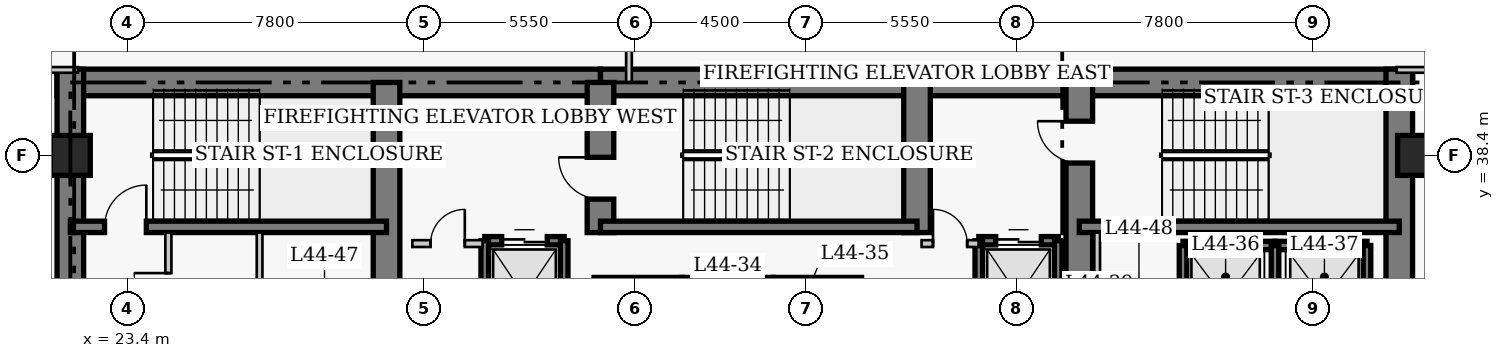
"""IFC4 building model, lengths in metres.
Left out: names, types, materials, properties, quantities, classifications, styles, units other than length and angle.
Written with IfcOpenShell. Run it as: python <this file> out.ifc"""

import sys

from ifc_helpers import new_model, si_unit, direction, frame, frame_2d, origin, origin_2d, place, context, subcontext, project, spatial, rectangle, extrude, element, fill, save


model = new_model("IFC4")
c1 = context("Model", 3, precision=1e-05, world=origin(), true_north=direction((0.0, 1.0)))
c2 = subcontext(c1, "Body", "Model", "MODEL_VIEW")
j1 = project(units=[si_unit("LENGTHUNIT", "METRE"), si_unit("PLANEANGLEUNIT", "RADIAN")], contexts=[c1])
p1 = place(None, origin())
s1 = spatial("IfcSite", under=j1, at=p1, CompositionType="ELEMENT")
p2 = place(p1, origin())
s2 = spatial("IfcBuilding", under=s1, at=p2, CompositionType="ELEMENT")
p3 = place(p2, frame((0.0, 0.0, 176.4)))
s3 = spatial("IfcBuildingStorey", under=s2, at=p3, CompositionType="ELEMENT", Elevation=176.4)
p4 = place(p3, frame((21.55, 40.32, 0.0), z_axis=(0.0, 0.0, 1.0), x_axis=(1.0, 0.0, 0.0)))
e1 = element("IfcWall", 1, at=p4, inside=s3, PredefinedType="SHEAR", context=c2, shape_type="SweptSolid", body=[
    extrude(rectangle(XDim=14.3, YDim=0.7, at=frame_2d((7.15, 0.0))), origin(), (0.0, 0.0, 1.0), 3.8),
])
p5 = place(p3, frame((35.85, 40.32, 0.0), z_axis=(0.0, 0.0, 1.0), x_axis=(1.0, 0.0, 0.0)))
e2 = element("IfcWall", 2, at=p5, inside=s3, PredefinedType="SHEAR", context=c2, shape_type="SweptSolid", body=[
    extrude(rectangle(XDim=12.6, YDim=0.7, at=frame_2d((6.3, 0.0))), origin(), (0.0, 0.0, 1.0), 3.8),
])
p6 = place(p3, frame((48.45, 40.32, 0.0), z_axis=(0.0, 0.0, 1.0), x_axis=(1.0, 0.0, 0.0)))
e3 = element("IfcWall", 3, at=p6, inside=s3, PredefinedType="SHEAR", context=c2, shape_type="SweptSolid", body=[
    extrude(rectangle(XDim=8.77, YDim=0.7, at=frame_2d((4.385, 0.0))), origin(), (0.0, 0.0, 1.0), 3.8),
])
for number, where, z_axis, x_axis in (
    (4, (21.9, 27.05, 0.0), (0.0, 0.0, 1.0), (0.0, 1.0, 0.0)),
    (5, (56.87, 27.05, 0.0), (0.0, 0.0, 1.0), (0.0, 1.0, 0.0)),
):
    element("IfcWall", number, at=place(p3, frame(where, z_axis=z_axis, x_axis=x_axis)), inside=s3, PredefinedType="SHEAR", context=c2, shape_type="SweptSolid", body=[
        extrude(rectangle(XDim=13.62, YDim=0.7, at=frame_2d((6.81, 0.0))), origin(), (0.0, 0.0, 1.0), 3.8),
    ])
p7 = place(p3, frame((30.22, 33.1, 0.0), z_axis=(0.0, 0.0, 1.0), x_axis=(0.0, 1.0, 0.0)))
e6 = element("IfcWall", 6, at=p7, inside=s3, PredefinedType="SHEAR", context=c2, shape_type="SweptSolid", body=[
    extrude(rectangle(XDim=7.22, YDim=0.7, at=frame_2d((3.61, 0.0))), origin(), (0.0, 0.0, 1.0), 3.8),
])
p8 = place(p3, frame((35.85, 36.37, 0.0), z_axis=(0.0, 0.0, 1.0), x_axis=(0.0, 1.0, 0.0)))
e7 = element("IfcWall", 7, at=p8, inside=s3, PredefinedType="SHEAR", context=c2, shape_type="SweptSolid", body=[
    extrude(rectangle(XDim=3.95, YDim=0.7, at=frame_2d((1.975, 0.0))), origin(), (0.0, 0.0, 1.0), 3.8),
])
p9 = place(p8, frame((0.88, 0.0, 0.0)))
e8 = element("IfcOpeningElement", 8, at=p9, cuts=e7, PredefinedType="OPENING", context=c2, shape_type="SweptSolid", body=[
    extrude(rectangle(XDim=1.1, YDim=2.15, at=frame_2d((0.55, 1.075))), frame((0.0, 0.36, 0.0), z_axis=(0.0, -1.0, 0.0), x_axis=(1.0, 0.0, 0.0)), (0.0, 0.0, 1.0), 0.72),
])
p10 = place(p3, frame((44.18, 36.37, 0.0), z_axis=(0.0, 0.0, 1.0), x_axis=(0.0, 1.0, 0.0)))
e9 = element("IfcWall", 9, at=p10, inside=s3, PredefinedType="SHEAR", context=c2, shape_type="SweptSolid", body=[
    extrude(rectangle(XDim=3.95, YDim=0.7, at=frame_2d((1.975, 0.0))), origin(), (0.0, 0.0, 1.0), 3.8),
])
p11 = place(p3, frame((48.45, 32.4, 0.0), z_axis=(0.0, 0.0, 1.0), x_axis=(0.0, 1.0, 0.0)))
e10 = element("IfcWall", 10, at=p11, inside=s3, PredefinedType="SHEAR", context=c2, shape_type="SweptSolid", body=[
    extrude(rectangle(XDim=7.92, YDim=0.7, at=frame_2d((3.96, 0.0))), origin(), (0.0, 0.0, 1.0), 3.8),
])
p12 = place(p11, frame((5.8, 0.0, 0.0)))
e11 = element("IfcOpeningElement", 11, at=p12, cuts=e10, PredefinedType="OPENING", context=c2, shape_type="SweptSolid", body=[
    extrude(rectangle(XDim=1.1, YDim=2.15, at=frame_2d((0.55, 1.075))), frame((0.0, 0.36, 0.0), z_axis=(0.0, -1.0, 0.0), x_axis=(1.0, 0.0, 0.0)), (0.0, 0.0, 1.0), 0.72),
])
p13 = place(p3, frame((21.9, 36.52, 0.0), z_axis=(0.0, 0.0, 1.0), x_axis=(1.0, 0.0, 0.0)))
e12 = element("IfcWall", 12, at=p13, inside=s3, PredefinedType="SHEAR", context=c2, shape_type="SweptSolid", body=[
    extrude(rectangle(XDim=8.32, YDim=0.3, at=frame_2d((4.16, 0.0))), origin(), (0.0, 0.0, 1.0), 3.8),
])
p14 = place(p13, frame((0.9, 0.0, 0.0)))
e13 = element("IfcOpeningElement", 13, at=p14, cuts=e12, PredefinedType="OPENING", context=c2, shape_type="SweptSolid", body=[
    extrude(rectangle(XDim=1.1, YDim=2.15, at=frame_2d((0.55, 1.075))), frame((0.0, 0.16, 0.0), z_axis=(0.0, -1.0, 0.0), x_axis=(1.0, 0.0, 0.0)), (0.0, 0.0, 1.0), 0.32),
])
p15 = place(p3, frame((35.85, 36.52, 0.0), z_axis=(0.0, 0.0, 1.0), x_axis=(1.0, 0.0, 0.0)))
e14 = element("IfcWall", 14, at=p15, inside=s3, PredefinedType="SHEAR", context=c2, shape_type="SweptSolid", body=[
    extrude(rectangle(XDim=8.33, YDim=0.3, at=frame_2d((4.165, 0.0))), origin(), (0.0, 0.0, 1.0), 3.8),
])
p16 = place(p3, frame((48.45, 36.52, 0.0), z_axis=(0.0, 0.0, 1.0), x_axis=(1.0, 0.0, 0.0)))
e15 = element("IfcWall", 15, at=p16, inside=s3, PredefinedType="SHEAR", context=c2, shape_type="SweptSolid", body=[
    extrude(rectangle(XDim=8.42, YDim=0.3, at=frame_2d((4.21, 0.0))), origin(), (0.0, 0.0, 1.0), 3.8),
])
for number, where, z_axis, x_axis in (
    (16, (21.9, 38.4, 0.0), (0.0, 0.0, 1.0), (1.0, 0.0, 0.0)),
    (17, (57.35, 38.4, 0.0), (0.0, 0.0, 1.0), (1.0, 0.0, 0.0)),
):
    element("IfcColumn", number, at=place(p3, frame(where, z_axis=z_axis, x_axis=x_axis)), inside=s3, PredefinedType="COLUMN", context=c2, shape_type="SweptSolid", body=[
        extrude(rectangle(XDim=1.05, YDim=1.05, at=origin_2d()), origin(), (0.0, 0.0, 1.0), 3.8),
    ])
p17 = place(p3, frame((35.68, 35.08, 0.0), z_axis=(0.0, 0.0, 1.0), x_axis=(1.0, 0.0, 0.0)))
e18 = element("IfcWall", 18, at=p17, inside=s3, PredefinedType="SHEAR", context=c2, shape_type="SweptSolid", body=[
    extrude(rectangle(XDim=2.32, YDim=0.22, at=frame_2d((1.16, 0.0))), origin(), (0.0, 0.0, 1.0), 3.8),
])
p18 = place(p3, frame((38.0, 35.08, 0.0), z_axis=(0.0, 0.0, 1.0), x_axis=(1.0, 0.0, 0.0)))
e19 = element("IfcWall", 19, at=p18, inside=s3, PredefinedType="SHEAR", context=c2, shape_type="SweptSolid", body=[
    extrude(rectangle(XDim=2.4, YDim=0.22, at=frame_2d((1.2, 0.0))), origin(), (0.0, 0.0, 1.0), 3.8),
])
p19 = place(p3, frame((40.4, 35.08, 0.0), z_axis=(0.0, 0.0, 1.0), x_axis=(1.0, 0.0, 0.0)))
e20 = element("IfcWall", 20, at=p19, inside=s3, PredefinedType="SHEAR", context=c2, shape_type="SweptSolid", body=[
    extrude(rectangle(XDim=2.32, YDim=0.22, at=frame_2d((1.16, 0.0))), origin(), (0.0, 0.0, 1.0), 3.8),
])
p20 = place(p3, frame((51.18, 36.03, 0.0), z_axis=(0.0, 0.0, 1.0), x_axis=(1.0, 0.0, 0.0)))
e21 = element("IfcWall", 21, at=p20, inside=s3, PredefinedType="SHEAR", context=c2, shape_type="SweptSolid", body=[
    extrude(rectangle(XDim=2.42, YDim=0.22, at=frame_2d((1.21, 0.0))), origin(), (0.0, 0.0, 1.0), 3.8),
])
p21 = place(p3, frame((51.18, 33.17, 0.0), z_axis=(0.0, 0.0, 1.0), x_axis=(0.0, 1.0, 0.0)))
e22 = element("IfcWall", 22, at=p21, inside=s3, PredefinedType="SHEAR", context=c2, shape_type="SweptSolid", body=[
    extrude(rectangle(XDim=2.86, YDim=0.2, at=frame_2d((1.43, 0.0))), origin(), (0.0, 0.0, 1.0), 3.8),
])
p22 = place(p3, frame((53.6, 36.03, 0.0), z_axis=(0.0, 0.0, 1.0), x_axis=(1.0, 0.0, 0.0)))
e23 = element("IfcWall", 23, at=p22, inside=s3, PredefinedType="SHEAR", context=c2, shape_type="SweptSolid", body=[
    extrude(rectangle(XDim=2.42, YDim=0.22, at=frame_2d((1.21, 0.0))), origin(), (0.0, 0.0, 1.0), 3.8),
])
for number, where, z_axis, x_axis in (
    (24, (53.6, 33.17, 0.0), (0.0, 0.0, 1.0), (0.0, 1.0, 0.0)),
    (25, (56.02, 33.17, 0.0), (0.0, 0.0, 1.0), (0.0, 1.0, 0.0)),
):
    element("IfcWall", number, at=place(p3, frame(where, z_axis=z_axis, x_axis=x_axis)), inside=s3, PredefinedType="SHEAR", context=c2, shape_type="SweptSolid", body=[
        extrude(rectangle(XDim=2.86, YDim=0.2, at=frame_2d((1.43, 0.0))), origin(), (0.0, 0.0, 1.0), 3.8),
    ])
p23 = place(p3, frame((32.805, 36.155, 0.0), z_axis=(0.0, 0.0, 1.0), x_axis=(1.0, 0.0, 0.0)))
e26 = element("IfcWall", 26, at=p23, inside=s3, PredefinedType="SHEAR", context=c2, shape_type="SweptSolid", body=[
    extrude(rectangle(XDim=2.09, YDim=0.22, at=frame_2d((1.045, 0.0))), origin(), (0.0, 0.0, 1.0), 3.8),
])
p24 = place(p23, frame((0.445, 0.0, 0.0)))
e27 = element("IfcOpeningElement", 27, at=p24, cuts=e26, PredefinedType="OPENING", context=c2, shape_type="SweptSolid", body=[
    extrude(rectangle(XDim=1.2, YDim=2.15, at=frame_2d((0.6, 1.075))), frame((0.0, 0.12, 0.0), z_axis=(0.0, -1.0, 0.0), x_axis=(1.0, 0.0, 0.0)), (0.0, 0.0, 1.0), 0.24),
])
for number, where, z_axis, x_axis in (
    (28, (32.805, 33.245, 0.0), (0.0, 0.0, 1.0), (0.0, 1.0, 0.0)),
    (29, (34.895, 33.245, 0.0), (0.0, 0.0, 1.0), (0.0, 1.0, 0.0)),
):
    element("IfcWall", number, at=place(p3, frame(where, z_axis=z_axis, x_axis=x_axis)), inside=s3, PredefinedType="SHEAR", context=c2, shape_type="SweptSolid", body=[
        extrude(rectangle(XDim=2.91, YDim=0.2, at=frame_2d((1.455, 0.0))), origin(), (0.0, 0.0, 1.0), 3.8),
    ])
p25 = place(p3, frame((45.805, 36.155, 0.0), z_axis=(0.0, 0.0, 1.0), x_axis=(1.0, 0.0, 0.0)))
e30 = element("IfcWall", 30, at=p25, inside=s3, PredefinedType="SHEAR", context=c2, shape_type="SweptSolid", body=[
    extrude(rectangle(XDim=2.09, YDim=0.22, at=frame_2d((1.045, 0.0))), origin(), (0.0, 0.0, 1.0), 3.8),
])
p26 = place(p25, frame((0.445, 0.0, 0.0)))
e31 = element("IfcOpeningElement", 31, at=p26, cuts=e30, PredefinedType="OPENING", context=c2, shape_type="SweptSolid", body=[
    extrude(rectangle(XDim=1.2, YDim=2.15, at=frame_2d((0.6, 1.075))), frame((0.0, 0.12, 0.0), z_axis=(0.0, -1.0, 0.0), x_axis=(1.0, 0.0, 0.0)), (0.0, 0.0, 1.0), 0.24),
])
p27 = place(p3, frame((45.805, 32.65, 0.0), z_axis=(0.0, 0.0, 1.0), x_axis=(0.0, 1.0, 0.0)))
e32 = element("IfcWall", 32, at=p27, inside=s3, PredefinedType="SHEAR", context=c2, shape_type="SweptSolid", body=[
    extrude(rectangle(XDim=3.505, YDim=0.2, at=frame_2d((1.752, 0.0))), origin(), (0.0, 0.0, 1.0), 3.8),
])
p28 = place(p3, frame((47.895, 33.245, 0.0), z_axis=(0.0, 0.0, 1.0), x_axis=(0.0, 1.0, 0.0)))
e33 = element("IfcWall", 33, at=p28, inside=s3, PredefinedType="SHEAR", context=c2, shape_type="SweptSolid", body=[
    extrude(rectangle(XDim=2.91, YDim=0.2, at=frame_2d((1.455, 0.0))), origin(), (0.0, 0.0, 1.0), 3.8),
])
p29 = place(p3, frame((30.9, 36.08, 0.0), z_axis=(0.0, 0.0, 1.0), x_axis=(1.0, 0.0, 0.0)))
e34 = element("IfcWall", 34, at=p29, inside=s3, PredefinedType="PARTITIONING", context=c2, shape_type="SweptSolid", body=[
    extrude(rectangle(XDim=1.85, YDim=0.18, at=frame_2d((0.925, 0.0))), origin(), (0.0, 0.0, 1.0), 3.55),
])
p30 = place(p29, frame((0.48, 0.0, 0.0)))
e35 = element("IfcOpeningElement", 35, at=p30, cuts=e34, PredefinedType="OPENING", context=c2, shape_type="SweptSolid", body=[
    extrude(rectangle(XDim=0.9, YDim=2.15, at=frame_2d((0.45, 1.075))), frame((0.0, 0.1, 0.0), z_axis=(0.0, -1.0, 0.0), x_axis=(1.0, 0.0, 0.0)), (0.0, 0.0, 1.0), 0.2),
])
p31 = place(p3, frame((44.3, 36.08, 0.0), z_axis=(0.0, 0.0, 1.0), x_axis=(1.0, 0.0, 0.0)))
e36 = element("IfcWall", 36, at=p31, inside=s3, PredefinedType="PARTITIONING", context=c2, shape_type="SweptSolid", body=[
    extrude(rectangle(XDim=1.5, YDim=0.18, at=frame_2d((0.75, 0.0))), origin(), (0.0, 0.0, 1.0), 3.55),
])
p32 = place(p31, frame((0.3, 0.0, 0.0)))
e37 = element("IfcOpeningElement", 37, at=p32, cuts=e36, PredefinedType="OPENING", context=c2, shape_type="SweptSolid", body=[
    extrude(rectangle(XDim=0.9, YDim=2.15, at=frame_2d((0.45, 1.075))), frame((0.0, 0.1, 0.0), z_axis=(0.0, -1.0, 0.0), x_axis=(1.0, 0.0, 0.0)), (0.0, 0.0, 1.0), 0.2),
])
p33 = place(p3, frame((24.48, 32.8, 0.0), z_axis=(0.0, 0.0, 1.0), x_axis=(0.0, 1.0, 0.0)))
e38 = element("IfcWall", 38, at=p33, inside=s3, PredefinedType="PARTITIONING", context=c2, shape_type="SweptSolid", body=[
    extrude(rectangle(XDim=3.57, YDim=0.16, at=frame_2d((1.785, 0.0))), origin(), (0.0, 0.0, 1.0), 3.55),
])
p34 = place(p33, frame((1.604, 0.0, 0.0)))
e39 = element("IfcOpeningElement", 39, at=p34, cuts=e38, PredefinedType="OPENING", context=c2, shape_type="SweptSolid", body=[
    extrude(rectangle(XDim=0.9, YDim=2.1, at=frame_2d((0.45, 1.05))), frame((0.0, 0.09, 0.0), z_axis=(0.0, -1.0, 0.0), x_axis=(1.0, 0.0, 0.0)), (0.0, 0.0, 1.0), 0.18),
])
for number, where, z_axis, x_axis in (
    (40, (48.92, 32.75, 0.0), (0.0, 0.0, 1.0), (0.0, 1.0, 0.0)),
    (41, (26.88, 32.75, 0.0), (0.0, 0.0, 1.0), (0.0, 1.0, 0.0)),
):
    element("IfcWall", number, at=place(p3, frame(where, z_axis=z_axis, x_axis=x_axis)), inside=s3, PredefinedType="PARTITIONING", context=c2, shape_type="SweptSolid", body=[
        extrude(rectangle(XDim=3.62, YDim=0.15, at=frame_2d((1.81, 0.0))), origin(), (0.0, 0.0, 1.0), 3.55),
    ])
p35 = place(p3, frame((18.24, 40.65, 0.0), z_axis=(0.0, 0.0, 1.0), x_axis=(1.0, 0.0, 0.0)))
e42 = element("IfcWall", 42, at=p35, inside=s3, PredefinedType="PARTITIONING", context=c2, shape_type="SweptSolid", body=[
    extrude(rectangle(XDim=3.86, YDim=0.15, at=frame_2d((1.93, 0.0))), origin(), (0.0, 0.0, 1.0), 3.55),
])
p36 = place(p35, frame((0.55, 0.0, 0.0)))
e43 = element("IfcOpeningElement", 43, at=p36, cuts=e42, PredefinedType="OPENING", context=c2, shape_type="SweptSolid", body=[
    extrude(rectangle(XDim=1.0, YDim=2.15, at=frame_2d((0.5, 1.075))), frame((0.0, 0.085, 0.0), z_axis=(0.0, -1.0, 0.0), x_axis=(1.0, 0.0, 0.0)), (0.0, 0.0, 1.0), 0.17),
])
p37 = place(p3, frame((56.8, 40.65, 0.0), z_axis=(0.0, 0.0, 1.0), x_axis=(1.0, 0.0, 0.0)))
e44 = element("IfcWall", 44, at=p37, inside=s3, PredefinedType="PARTITIONING", context=c2, shape_type="SweptSolid", body=[
    extrude(rectangle(XDim=4.56, YDim=0.15, at=frame_2d((2.28, 0.0))), origin(), (0.0, 0.0, 1.0), 3.55),
])
p38 = place(p37, frame((2.95, 0.0, 0.0)))
e45 = element("IfcOpeningElement", 45, at=p38, cuts=e44, PredefinedType="OPENING", context=c2, shape_type="SweptSolid", body=[
    extrude(rectangle(XDim=1.0, YDim=2.15, at=frame_2d((0.5, 1.075))), frame((0.0, 0.085, 0.0), z_axis=(0.0, -1.0, 0.0), x_axis=(1.0, 0.0, 0.0)), (0.0, 0.0, 1.0), 0.17),
])
p39 = place(p3, frame((36.6, 40.32, 0.0), z_axis=(0.0, 0.0, 1.0), x_axis=(0.0, 1.0, 0.0)))
e46 = element("IfcWall", 46, at=p39, inside=s3, PredefinedType="PARTITIONING", context=c2, shape_type="SweptSolid", body=[
    extrude(rectangle(XDim=1.845, YDim=0.15, at=frame_2d((0.922, 0.0))), origin(), (0.0, 0.0, 1.0), 3.55),
])
p40 = place(p24, origin())
e47 = element("IfcDoor", 47, at=p40, inside=s3, OperationType="DOUBLE_DOOR_SLIDING", PredefinedType="DOOR", context=c2, shape_type="SweptSolid", body=[
    extrude(rectangle(XDim=1.2, YDim=2.15, at=frame_2d((0.6, 1.075))), frame((0.0, 0.025, 0.0), z_axis=(0.0, -1.0, 0.0), x_axis=(1.0, 0.0, 0.0)), (0.0, 0.0, 1.0), 0.05),
])
fill(e27, e47)
p41 = place(p26, origin())
e48 = element("IfcDoor", 48, at=p41, inside=s3, OperationType="DOUBLE_DOOR_SLIDING", PredefinedType="DOOR", context=c2, shape_type="SweptSolid", body=[
    extrude(rectangle(XDim=1.2, YDim=2.15, at=frame_2d((0.6, 1.075))), frame((0.0, 0.025, 0.0), z_axis=(0.0, -1.0, 0.0), x_axis=(1.0, 0.0, 0.0)), (0.0, 0.0, 1.0), 0.05),
])
fill(e31, e48)
p42 = place(p30, origin())
e49 = element("IfcDoor", 49, at=p42, inside=s3, OperationType="SINGLE_SWING_RIGHT", PredefinedType="DOOR", context=c2, shape_type="SweptSolid", body=[
    extrude(rectangle(XDim=0.9, YDim=2.15, at=frame_2d((0.45, 1.075))), frame((0.0, 0.025, 0.0), z_axis=(0.0, -1.0, 0.0), x_axis=(1.0, 0.0, 0.0)), (0.0, 0.0, 1.0), 0.05),
])
fill(e35, e49)
p43 = place(p32, origin())
e50 = element("IfcDoor", 50, at=p43, inside=s3, OperationType="SINGLE_SWING_LEFT", PredefinedType="DOOR", context=c2, shape_type="SweptSolid", body=[
    extrude(rectangle(XDim=0.9, YDim=2.15, at=frame_2d((0.45, 1.075))), frame((0.0, 0.025, 0.0), z_axis=(0.0, -1.0, 0.0), x_axis=(1.0, 0.0, 0.0)), (0.0, 0.0, 1.0), 0.05),
])
fill(e37, e50)
p44 = place(p34, origin())
e51 = element("IfcDoor", 51, at=p44, inside=s3, OperationType="SINGLE_SWING_RIGHT", PredefinedType="DOOR", context=c2, shape_type="SweptSolid", body=[
    extrude(rectangle(XDim=0.9, YDim=2.1, at=frame_2d((0.45, 1.05))), frame((0.0, 0.025, 0.0), z_axis=(0.0, -1.0, 0.0), x_axis=(1.0, 0.0, 0.0)), (0.0, 0.0, 1.0), 0.05),
])
fill(e39, e51)
p45 = place(p14, origin())
e52 = element("IfcDoor", 52, at=p45, inside=s3, OperationType="SINGLE_SWING_RIGHT", PredefinedType="DOOR", context=c2, shape_type="SweptSolid", body=[
    extrude(rectangle(XDim=1.1, YDim=2.15, at=frame_2d((0.55, 1.075))), frame((0.0, 0.025, 0.0), z_axis=(0.0, -1.0, 0.0), x_axis=(1.0, 0.0, 0.0)), (0.0, 0.0, 1.0), 0.05),
])
fill(e13, e52)
p46 = place(p9, origin())
e53 = element("IfcDoor", 53, at=p46, inside=s3, OperationType="SINGLE_SWING_RIGHT", PredefinedType="DOOR", context=c2, shape_type="SweptSolid", body=[
    extrude(rectangle(XDim=1.1, YDim=2.15, at=frame_2d((0.55, 1.075))), frame((0.0, 0.025, 0.0), z_axis=(0.0, -1.0, 0.0), x_axis=(1.0, 0.0, 0.0)), (0.0, 0.0, 1.0), 0.05),
])
fill(e8, e53)
p47 = place(p12, origin())
e54 = element("IfcDoor", 54, at=p47, inside=s3, OperationType="SINGLE_SWING_RIGHT", PredefinedType="DOOR", context=c2, shape_type="SweptSolid", body=[
    extrude(rectangle(XDim=1.1, YDim=2.15, at=frame_2d((0.55, 1.075))), frame((0.0, 0.025, 0.0), z_axis=(0.0, -1.0, 0.0), x_axis=(1.0, 0.0, 0.0)), (0.0, 0.0, 1.0), 0.05),
])
fill(e11, e54)
save(model, sys.argv[1])
